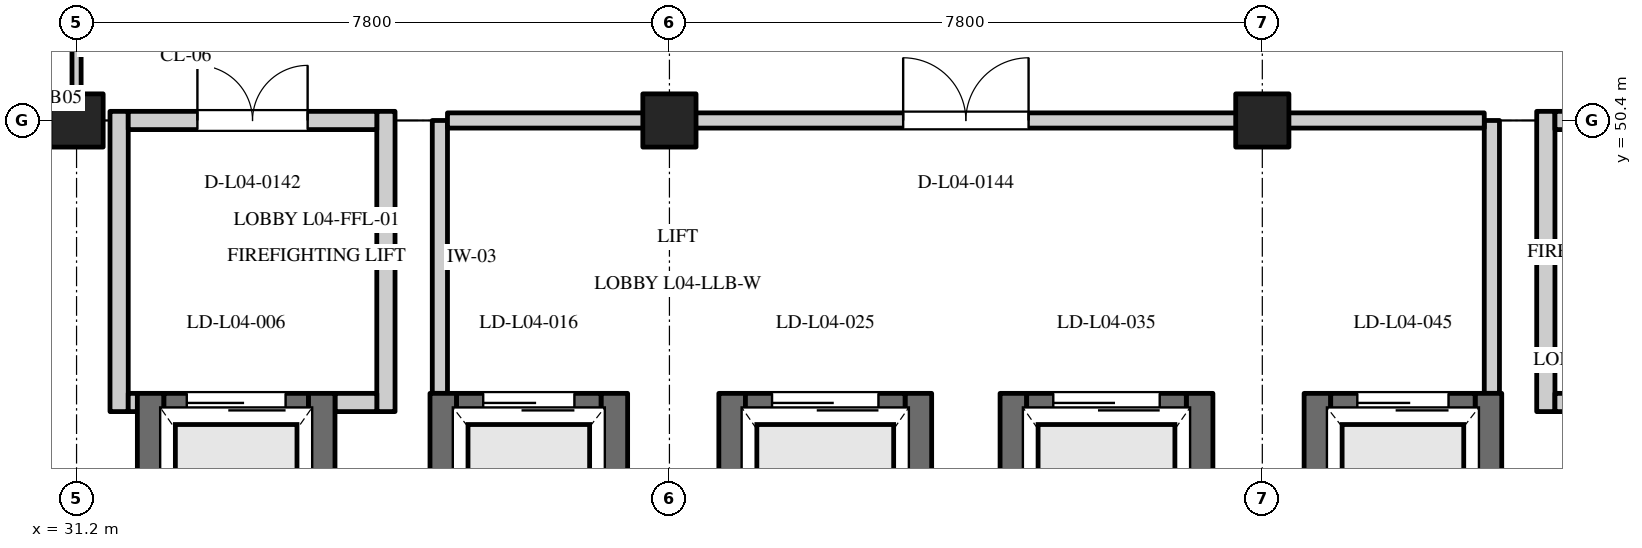
"""IFC4 building model, lengths in metres.
Left out: names, types, materials, properties, quantities, classifications, styles, units other than length and angle.
Written with IfcOpenShell. Run it as: python <this file> out.ifc"""

import sys

from ifc_helpers import new_model, si_unit, direction, frame, frame_2d, origin, origin_2d, place, context, subcontext, project, spatial, rectangle, extrude, element, fill, save


model = new_model("IFC4")
c1 = context("Model", 3, precision=1e-05, world=origin(), true_north=direction((0.0, 1.0)))
c2 = subcontext(c1, "Body", "Model", "MODEL_VIEW")
j1 = project(units=[si_unit("LENGTHUNIT", "METRE"), si_unit("PLANEANGLEUNIT", "RADIAN")], contexts=[c1])
p1 = place(None, origin())
s1 = spatial("IfcSite", under=j1, at=p1, CompositionType="ELEMENT")
p2 = place(p1, origin())
s2 = spatial("IfcBuilding", under=s1, at=p2, CompositionType="ELEMENT")
p3 = place(p2, frame((0.0, 0.0, 18.0)))
s3 = spatial("IfcBuildingStorey", under=s2, at=p3, CompositionType="ELEMENT", Elevation=18.0)
for number, where, z_axis, x_axis in (
    (1, (31.2, 50.4, 0.0), (0.0, 0.0, 1.0), (1.0, 0.0, 0.0)),
    (2, (39.0, 50.4, 0.0), (0.0, 0.0, 1.0), (1.0, 0.0, 0.0)),
    (3, (46.8, 50.4, 0.0), (0.0, 0.0, 1.0), (1.0, 0.0, 0.0)),
):
    element("IfcColumn", number, at=place(p3, frame(where, z_axis=z_axis, x_axis=x_axis)), inside=s3, PredefinedType="COLUMN", context=c2, shape_type="SweptSolid", body=[
        extrude(rectangle(XDim=0.7, YDim=0.7, at=origin_2d()), origin(), (0.0, 0.0, 1.0), 4.2),
    ])
for number, where, z_axis, x_axis in (
    (4, (32.175, 43.06, 0.0), (0.0, 0.0, 1.0), (0.0, 1.0, 0.0)),
    (5, (34.425, 43.06, 0.0), (0.0, 0.0, 1.0), (0.0, 1.0, 0.0)),
):
    element("IfcWall", number, at=place(p3, frame(where, z_axis=z_axis, x_axis=x_axis)), inside=s3, PredefinedType="SHEAR", context=c2, shape_type="SweptSolid", body=[
        extrude(rectangle(XDim=3.75, YDim=0.35, at=frame_2d((1.875, 0.0))), origin(), (0.0, 0.0, 1.0), 4.2),
    ])
p4 = place(p3, frame((32.35, 46.635, 0.0), z_axis=(0.0, 0.0, 1.0), x_axis=(1.0, 0.0, 0.0)))
e6 = element("IfcWall", 6, at=p4, inside=s3, PredefinedType="SHEAR", context=c2, shape_type="SweptSolid", body=[
    extrude(rectangle(XDim=1.9, YDim=0.35, at=frame_2d((0.95, 0.0))), origin(), (0.0, 0.0, 1.0), 3.885),
])
p5 = place(p4, frame((0.3, 0.0, 0.0)))
e7 = element("IfcOpeningElement", 7, at=p5, cuts=e6, PredefinedType="OPENING", context=c2, shape_type="SweptSolid", body=[
    extrude(rectangle(XDim=1.3, YDim=2.2, at=frame_2d((0.65, 1.1))), frame((0.0, 0.187, 0.0), z_axis=(0.0, -1.0, 0.0), x_axis=(1.0, 0.0, 0.0)), (0.0, 0.0, 1.0), 0.374),
])
for number, where, z_axis, x_axis in (
    (8, (36.025, 43.36, 0.0), (0.0, 0.0, 1.0), (0.0, 1.0, 0.0)),
    (9, (38.275, 43.36, 0.0), (0.0, 0.0, 1.0), (0.0, 1.0, 0.0)),
):
    element("IfcWall", number, at=place(p3, frame(where, z_axis=z_axis, x_axis=x_axis)), inside=s3, PredefinedType="SHEAR", context=c2, shape_type="SweptSolid", body=[
        extrude(rectangle(XDim=3.45, YDim=0.35, at=frame_2d((1.725, 0.0))), origin(), (0.0, 0.0, 1.0), 4.2),
    ])
p6 = place(p3, frame((36.2, 46.635, 0.0), z_axis=(0.0, 0.0, 1.0), x_axis=(1.0, 0.0, 0.0)))
e10 = element("IfcWall", 10, at=p6, inside=s3, PredefinedType="SHEAR", context=c2, shape_type="SweptSolid", body=[
    extrude(rectangle(XDim=1.9, YDim=0.35, at=frame_2d((0.95, 0.0))), origin(), (0.0, 0.0, 1.0), 3.885),
])
p7 = place(p6, frame((0.35, 0.0, 0.0)))
e11 = element("IfcOpeningElement", 11, at=p7, cuts=e10, PredefinedType="OPENING", context=c2, shape_type="SweptSolid", body=[
    extrude(rectangle(XDim=1.2, YDim=2.2, at=frame_2d((0.6, 1.1))), frame((0.0, 0.187, 0.0), z_axis=(0.0, -1.0, 0.0), x_axis=(1.0, 0.0, 0.0)), (0.0, 0.0, 1.0), 0.374),
])
for number, where, z_axis, x_axis in (
    (12, (39.825, 42.76, 0.0), (0.0, 0.0, 1.0), (0.0, 1.0, 0.0)),
    (13, (42.275, 42.76, 0.0), (0.0, 0.0, 1.0), (0.0, 1.0, 0.0)),
):
    element("IfcWall", number, at=place(p3, frame(where, z_axis=z_axis, x_axis=x_axis)), inside=s3, PredefinedType="SHEAR", context=c2, shape_type="SweptSolid", body=[
        extrude(rectangle(XDim=4.05, YDim=0.35, at=frame_2d((2.025, 0.0))), origin(), (0.0, 0.0, 1.0), 4.2),
    ])
p8 = place(p3, frame((40.0, 46.635, 0.0), z_axis=(0.0, 0.0, 1.0), x_axis=(1.0, 0.0, 0.0)))
e14 = element("IfcWall", 14, at=p8, inside=s3, PredefinedType="SHEAR", context=c2, shape_type="SweptSolid", body=[
    extrude(rectangle(XDim=2.1, YDim=0.35, at=frame_2d((1.05, 0.0))), origin(), (0.0, 0.0, 1.0), 3.885),
])
p9 = place(p8, frame((0.35, 0.0, 0.0)))
e15 = element("IfcOpeningElement", 15, at=p9, cuts=e14, PredefinedType="OPENING", context=c2, shape_type="SweptSolid", body=[
    extrude(rectangle(XDim=1.4, YDim=2.2, at=frame_2d((0.7, 1.1))), frame((0.0, 0.187, 0.0), z_axis=(0.0, -1.0, 0.0), x_axis=(1.0, 0.0, 0.0)), (0.0, 0.0, 1.0), 0.374),
])
for number, where, z_axis, x_axis in (
    (16, (43.525, 42.76, 0.0), (0.0, 0.0, 1.0), (0.0, 1.0, 0.0)),
    (17, (45.975, 42.76, 0.0), (0.0, 0.0, 1.0), (0.0, 1.0, 0.0)),
):
    element("IfcWall", number, at=place(p3, frame(where, z_axis=z_axis, x_axis=x_axis)), inside=s3, PredefinedType="SHEAR", context=c2, shape_type="SweptSolid", body=[
        extrude(rectangle(XDim=4.05, YDim=0.35, at=frame_2d((2.025, 0.0))), origin(), (0.0, 0.0, 1.0), 4.2),
    ])
p10 = place(p3, frame((43.7, 46.635, 0.0), z_axis=(0.0, 0.0, 1.0), x_axis=(1.0, 0.0, 0.0)))
e18 = element("IfcWall", 18, at=p10, inside=s3, PredefinedType="SHEAR", context=c2, shape_type="SweptSolid", body=[
    extrude(rectangle(XDim=2.1, YDim=0.35, at=frame_2d((1.05, 0.0))), origin(), (0.0, 0.0, 1.0), 3.885),
])
p11 = place(p10, frame((0.35, 0.0, 0.0)))
e19 = element("IfcOpeningElement", 19, at=p11, cuts=e18, PredefinedType="OPENING", context=c2, shape_type="SweptSolid", body=[
    extrude(rectangle(XDim=1.4, YDim=2.2, at=frame_2d((0.7, 1.1))), frame((0.0, 0.187, 0.0), z_axis=(0.0, -1.0, 0.0), x_axis=(1.0, 0.0, 0.0)), (0.0, 0.0, 1.0), 0.374),
])
for number, where, z_axis, x_axis in (
    (20, (47.525, 43.36, 0.0), (0.0, 0.0, 1.0), (0.0, 1.0, 0.0)),
    (21, (49.775, 43.36, 0.0), (0.0, 0.0, 1.0), (0.0, 1.0, 0.0)),
):
    element("IfcWall", number, at=place(p3, frame(where, z_axis=z_axis, x_axis=x_axis)), inside=s3, PredefinedType="SHEAR", context=c2, shape_type="SweptSolid", body=[
        extrude(rectangle(XDim=3.45, YDim=0.35, at=frame_2d((1.725, 0.0))), origin(), (0.0, 0.0, 1.0), 4.2),
    ])
p12 = place(p3, frame((47.7, 46.635, 0.0), z_axis=(0.0, 0.0, 1.0), x_axis=(1.0, 0.0, 0.0)))
e22 = element("IfcWall", 22, at=p12, inside=s3, PredefinedType="SHEAR", context=c2, shape_type="SweptSolid", body=[
    extrude(rectangle(XDim=1.9, YDim=0.35, at=frame_2d((0.95, 0.0))), origin(), (0.0, 0.0, 1.0), 3.885),
])
p13 = place(p12, frame((0.35, 0.0, 0.0)))
e23 = element("IfcOpeningElement", 23, at=p13, cuts=e22, PredefinedType="OPENING", context=c2, shape_type="SweptSolid", body=[
    extrude(rectangle(XDim=1.2, YDim=2.2, at=frame_2d((0.6, 1.1))), frame((0.0, 0.187, 0.0), z_axis=(0.0, -1.0, 0.0), x_axis=(1.0, 0.0, 0.0)), (0.0, 0.0, 1.0), 0.374),
])
for number, where, z_axis, x_axis in (
    (24, (31.76, 46.57, 0.0), (0.0, 0.0, 1.0), (0.0, 1.0, 0.0)),
    (25, (35.27, 46.57, 0.0), (0.0, 0.0, 1.0), (0.0, 1.0, 0.0)),
):
    element("IfcWall", number, at=place(p3, frame(where, z_axis=z_axis, x_axis=x_axis)), inside=s3, PredefinedType="STANDARD", context=c2, shape_type="SweptSolid", body=[
        extrude(rectangle(XDim=3.95, YDim=0.24, at=frame_2d((1.975, 0.0))), origin(), (0.0, 0.0, 1.0), 3.385),
    ])
p14 = place(p3, frame((31.88, 46.69, 0.0), z_axis=(0.0, 0.0, 1.0), x_axis=(1.0, 0.0, 0.0)))
e26 = element("IfcWall", 26, at=p14, inside=s3, PredefinedType="STANDARD", context=c2, shape_type="SweptSolid", body=[
    extrude(rectangle(XDim=0.12, YDim=0.24, at=frame_2d((0.06, 0.0))), origin(), (0.0, 0.0, 1.0), 3.385),
])
p15 = place(p3, frame((34.6, 46.69, 0.0), z_axis=(0.0, 0.0, 1.0), x_axis=(1.0, 0.0, 0.0)))
e27 = element("IfcWall", 27, at=p15, inside=s3, PredefinedType="STANDARD", context=c2, shape_type="SweptSolid", body=[
    extrude(rectangle(XDim=0.55, YDim=0.24, at=frame_2d((0.275, 0.0))), origin(), (0.0, 0.0, 1.0), 3.385),
])
p16 = place(p3, frame((31.88, 50.4, 0.0), z_axis=(0.0, 0.0, 1.0), x_axis=(1.0, 0.0, 0.0)))
e28 = element("IfcWall", 28, at=p16, inside=s3, PredefinedType="STANDARD", context=c2, shape_type="SweptSolid", body=[
    extrude(rectangle(XDim=3.27, YDim=0.24, at=frame_2d((1.635, 0.0))), origin(), (0.0, 0.0, 1.0), 3.385),
])
p17 = place(p16, frame((0.91, 0.0, 0.0)))
e29 = element("IfcOpeningElement", 29, at=p17, cuts=e28, PredefinedType="OPENING", context=c2, shape_type="SweptSolid", body=[
    extrude(rectangle(XDim=1.45, YDim=2.2, at=frame_2d((0.725, 1.1))), frame((0.0, 0.132, 0.0), z_axis=(0.0, -1.0, 0.0), x_axis=(1.0, 0.0, 0.0)), (0.0, 0.0, 1.0), 0.264),
])
p18 = place(p3, frame((50.53, 46.57, 0.0), z_axis=(0.0, 0.0, 1.0), x_axis=(0.0, 1.0, 0.0)))
e30 = element("IfcWall", 30, at=p18, inside=s3, PredefinedType="STANDARD", context=c2, shape_type="SweptSolid", body=[
    extrude(rectangle(XDim=3.95, YDim=0.24, at=frame_2d((1.975, 0.0))), origin(), (0.0, 0.0, 1.0), 3.385),
])
p19 = place(p3, frame((50.65, 46.69, 0.0), z_axis=(0.0, 0.0, 1.0), x_axis=(1.0, 0.0, 0.0)))
e31 = element("IfcWall", 31, at=p19, inside=s3, PredefinedType="STANDARD", context=c2, shape_type="SweptSolid", body=[
    extrude(rectangle(XDim=0.5, YDim=0.24, at=frame_2d((0.25, 0.0))), origin(), (0.0, 0.0, 1.0), 3.385),
])
p20 = place(p3, frame((50.65, 50.4, 0.0), z_axis=(0.0, 0.0, 1.0), x_axis=(1.0, 0.0, 0.0)))
e32 = element("IfcWall", 32, at=p20, inside=s3, PredefinedType="STANDARD", context=c2, shape_type="SweptSolid", body=[
    extrude(rectangle(XDim=3.37, YDim=0.24, at=frame_2d((1.685, 0.0))), origin(), (0.0, 0.0, 1.0), 3.385),
])
p21 = place(p20, frame((0.96, 0.0, 0.0)))
e33 = element("IfcOpeningElement", 33, at=p21, cuts=e32, PredefinedType="OPENING", context=c2, shape_type="SweptSolid", body=[
    extrude(rectangle(XDim=1.45, YDim=2.2, at=frame_2d((0.725, 1.1))), frame((0.0, 0.132, 0.0), z_axis=(0.0, -1.0, 0.0), x_axis=(1.0, 0.0, 0.0)), (0.0, 0.0, 1.0), 0.264),
])
for number, where, z_axis, x_axis in (
    (34, (35.98, 46.81, 0.0), (0.0, 0.0, 1.0), (0.0, 1.0, 0.0)),
    (35, (49.82, 46.81, 0.0), (0.0, 0.0, 1.0), (0.0, 1.0, 0.0)),
):
    element("IfcWall", number, at=place(p3, frame(where, z_axis=z_axis, x_axis=x_axis)), inside=s3, PredefinedType="STANDARD", context=c2, shape_type="SweptSolid", body=[
        extrude(rectangle(XDim=3.59, YDim=0.2, at=frame_2d((1.795, 0.0))), origin(), (0.0, 0.0, 1.0), 3.385),
    ])
p22 = place(p3, frame((36.08, 50.4, 0.0), z_axis=(0.0, 0.0, 1.0), x_axis=(1.0, 0.0, 0.0)))
e36 = element("IfcWall", 36, at=p22, inside=s3, PredefinedType="STANDARD", context=c2, shape_type="SweptSolid", body=[
    extrude(rectangle(XDim=13.64, YDim=0.2, at=frame_2d((6.82, 0.0))), origin(), (0.0, 0.0, 1.0), 3.385),
])
p23 = place(p22, frame((5.995, 0.0, 0.0)))
e37 = element("IfcOpeningElement", 37, at=p23, cuts=e36, PredefinedType="OPENING", context=c2, shape_type="SweptSolid", body=[
    extrude(rectangle(XDim=1.65, YDim=2.25, at=frame_2d((0.825, 1.125))), frame((0.0, 0.112, 0.0), z_axis=(0.0, -1.0, 0.0), x_axis=(1.0, 0.0, 0.0)), (0.0, 0.0, 1.0), 0.224),
])
p24 = place(p3, frame((23.52, 50.4, 0.0), z_axis=(0.0, 0.0, 1.0), x_axis=(1.0, 0.0, 0.0)))
e38 = element("IfcWall", 38, at=p24, inside=s3, PredefinedType="PARTITIONING", context=c2, shape_type="SweptSolid", body=[
    extrude(rectangle(XDim=7.56, YDim=0.1, at=frame_2d((3.78, 0.0))), origin(), (0.0, 0.0, 1.0), 3.235),
])
p25 = place(p3, frame((31.2, 50.52, 0.0), z_axis=(0.0, 0.0, 1.0), x_axis=(0.0, 1.0, 0.0)))
e39 = element("IfcWall", 39, at=p25, inside=s3, PredefinedType="PARTITIONING", context=c2, shape_type="SweptSolid", body=[
    extrude(rectangle(XDim=1.76, YDim=0.12, at=frame_2d((0.88, 0.0))), origin(), (0.0, 0.0, 1.0), 3.865),
])
p26 = place(p5, origin())
e40 = element("IfcDoor", 40, at=p26, inside=s3, OperationType="SLIDING_TO_LEFT", PredefinedType="DOOR", context=c2, shape_type="SweptSolid", body=[
    extrude(rectangle(XDim=1.3, YDim=2.2, at=frame_2d((0.65, 1.1))), frame((0.0, 0.025, 0.0), z_axis=(0.0, -1.0, 0.0), x_axis=(1.0, 0.0, 0.0)), (0.0, 0.0, 1.0), 0.05),
])
fill(e7, e40)
p27 = place(p7, origin())
e41 = element("IfcDoor", 41, at=p27, inside=s3, OperationType="SLIDING_TO_LEFT", PredefinedType="DOOR", context=c2, shape_type="SweptSolid", body=[
    extrude(rectangle(XDim=1.2, YDim=2.2, at=frame_2d((0.6, 1.1))), frame((0.0, 0.025, 0.0), z_axis=(0.0, -1.0, 0.0), x_axis=(1.0, 0.0, 0.0)), (0.0, 0.0, 1.0), 0.05),
])
fill(e11, e41)
p28 = place(p9, origin())
e42 = element("IfcDoor", 42, at=p28, inside=s3, OperationType="SLIDING_TO_LEFT", PredefinedType="DOOR", context=c2, shape_type="SweptSolid", body=[
    extrude(rectangle(XDim=1.4, YDim=2.2, at=frame_2d((0.7, 1.1))), frame((0.0, 0.025, 0.0), z_axis=(0.0, -1.0, 0.0), x_axis=(1.0, 0.0, 0.0)), (0.0, 0.0, 1.0), 0.05),
])
fill(e15, e42)
p29 = place(p11, origin())
e43 = element("IfcDoor", 43, at=p29, inside=s3, OperationType="SLIDING_TO_LEFT", PredefinedType="DOOR", context=c2, shape_type="SweptSolid", body=[
    extrude(rectangle(XDim=1.4, YDim=2.2, at=frame_2d((0.7, 1.1))), frame((0.0, 0.025, 0.0), z_axis=(0.0, -1.0, 0.0), x_axis=(1.0, 0.0, 0.0)), (0.0, 0.0, 1.0), 0.05),
])
fill(e19, e43)
p30 = place(p13, origin())
e44 = element("IfcDoor", 44, at=p30, inside=s3, OperationType="SLIDING_TO_LEFT", PredefinedType="DOOR", context=c2, shape_type="SweptSolid", body=[
    extrude(rectangle(XDim=1.2, YDim=2.2, at=frame_2d((0.6, 1.1))), frame((0.0, 0.025, 0.0), z_axis=(0.0, -1.0, 0.0), x_axis=(1.0, 0.0, 0.0)), (0.0, 0.0, 1.0), 0.05),
])
fill(e23, e44)
p31 = place(p17, origin())
e45 = element("IfcDoor", 45, at=p31, inside=s3, OperationType="DOUBLE_DOOR_SINGLE_SWING", PredefinedType="DOOR", context=c2, shape_type="SweptSolid", body=[
    extrude(rectangle(XDim=1.45, YDim=2.2, at=frame_2d((0.725, 1.1))), frame((0.0, 0.025, 0.0), z_axis=(0.0, -1.0, 0.0), x_axis=(1.0, 0.0, 0.0)), (0.0, 0.0, 1.0), 0.05),
])
fill(e29, e45)
p32 = place(p23, origin())
e46 = element("IfcDoor", 46, at=p32, inside=s3, OperationType="DOUBLE_DOOR_SINGLE_SWING", PredefinedType="DOOR", context=c2, shape_type="SweptSolid", body=[
    extrude(rectangle(XDim=1.65, YDim=2.25, at=frame_2d((0.825, 1.125))), frame((0.0, 0.025, 0.0), z_axis=(0.0, -1.0, 0.0), x_axis=(1.0, 0.0, 0.0)), (0.0, 0.0, 1.0), 0.05),
])
fill(e37, e46)
save(model, sys.argv[1])
